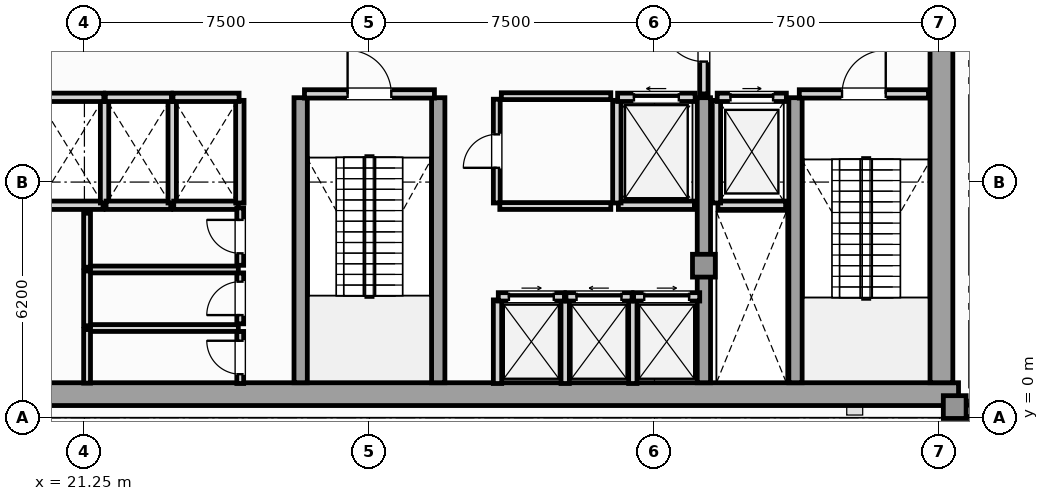
"""IFC4 building model, lengths in metres.
Left out: names, types, materials, properties, quantities, classifications, styles, units other than length and angle.
Written with IfcOpenShell. Run it as: python <this file> out.ifc"""

import sys

from ifc_helpers import new_model, si_unit, direction, frame, frame_2d, origin, origin_2d, place, context, subcontext, project, spatial, rectangle, extrude, element, fill, save


model = new_model("IFC4")
c1 = context("Model", 3, precision=1e-05, world=origin(), true_north=direction((0.0, 1.0)))
c2 = subcontext(c1, "Body", "Model", "MODEL_VIEW")
j1 = project(units=[si_unit("LENGTHUNIT", "METRE"), si_unit("PLANEANGLEUNIT", "RADIAN")], contexts=[c1])
p1 = place(None, origin())
s1 = spatial("IfcSite", under=j1, at=p1, CompositionType="ELEMENT")
p2 = place(p1, origin())
s2 = spatial("IfcBuilding", under=s1, at=p2, CompositionType="ELEMENT")
p3 = place(p2, frame((0.0, 0.0, 187.55)))
s3 = spatial("IfcBuildingStorey", under=s2, at=p3, CompositionType="ELEMENT", Elevation=187.55)
p4 = place(p3, frame((13.25, 0.62, 0.0), z_axis=(0.0, 0.0, 1.0), x_axis=(1.0, 0.0, 0.0)))
e1 = element("IfcWall", 1, at=p4, inside=s3, PredefinedType="SHEAR", context=c2, shape_type="SweptSolid", body=[
    extrude(rectangle(XDim=31.0, YDim=0.6, at=frame_2d((15.5, 0.0))), origin(), (0.0, 0.0, 1.0), 4.83),
])
p5 = place(p3, frame((43.8, 0.92, 0.0), z_axis=(0.0, 0.0, 1.0), x_axis=(0.0, 1.0, 0.0)))
e2 = element("IfcWall", 2, at=p5, inside=s3, PredefinedType="SHEAR", context=c2, shape_type="SweptSolid", body=[
    extrude(rectangle(XDim=10.53, YDim=0.6, at=frame_2d((5.265, 0.0))), origin(), (0.0, 0.0, 1.0), 4.83),
])
for number, where, z_axis, x_axis in (
    (3, (26.94, 0.92, 0.0), (0.0, 0.0, 1.0), (0.0, 1.0, 0.0)),
    (4, (30.56, 0.92, 0.0), (0.0, 0.0, 1.0), (0.0, 1.0, 0.0)),
    (5, (37.55, 0.92, 0.0), (0.0, 0.0, 1.0), (0.0, 1.0, 0.0)),
    (6, (39.96, 0.92, 0.0), (0.0, 0.0, 1.0), (0.0, 1.0, 0.0)),
):
    element("IfcWall", number, at=place(p3, frame(where, z_axis=z_axis, x_axis=x_axis)), inside=s3, PredefinedType="SHEAR", context=c2, shape_type="SweptSolid", body=[
        extrude(rectangle(XDim=7.5, YDim=0.35, at=frame_2d((3.75, 0.0))), origin(), (0.0, 0.0, 1.0), 4.83),
    ])
for number, where, z_axis, x_axis in (
    (7, (44.15, 0.28, 0.0), (0.0, 0.0, 1.0), (1.0, 0.0, 0.0)),
    (8, (37.55, 4.0, 0.0), (0.0, 0.0, 1.0), (1.0, 0.0, 0.0)),
):
    element("IfcColumn", number, at=place(p3, frame(where, z_axis=z_axis, x_axis=x_axis)), inside=s3, PredefinedType="COLUMN", context=c2, shape_type="SweptSolid", body=[
        extrude(rectangle(XDim=0.6, YDim=0.6, at=origin_2d()), origin(), (0.0, 0.0, 1.0), 5.05),
    ])
p6 = place(p3, frame((44.25, 0.18, 0.0), z_axis=(0.0, 0.0, 1.0), x_axis=(1.0, 0.0, 0.0)))
e9 = element("IfcWall", 9, at=p6, inside=s3, PredefinedType="SOLIDWALL", context=c2, shape_type="SweptSolid", body=[
    extrude(rectangle(XDim=4.81, YDim=0.3, at=frame_2d((2.405, 0.0))), origin(), (0.0, 0.0, 1.0), 4.83),
])
p7 = place(p6, frame((1.655, 0.0, 0.9)))
e10 = element("IfcOpeningElement", 10, at=p7, cuts=e9, PredefinedType="OPENING", context=c2, shape_type="SweptSolid", body=[
    extrude(rectangle(XDim=1.5, YDim=1.95, at=frame_2d((0.75, 0.975))), frame((0.0, 0.16, 0.0), z_axis=(0.0, -1.0, 0.0), x_axis=(1.0, 0.0, 0.0)), (0.0, 0.0, 1.0), 0.32),
])
p8 = place(p3, frame((37.92, 5.59, 0.0), z_axis=(0.0, 0.0, 1.0), x_axis=(1.0, 0.0, 0.0)))
e11 = element("IfcWall", 11, at=p8, inside=s3, PredefinedType="SOLIDWALL", context=c2, shape_type="SweptSolid", body=[
    extrude(rectangle(XDim=1.78, YDim=0.22, at=frame_2d((0.89, 0.0))), origin(), (0.0, 0.0, 1.0), 4.83),
])
p9 = place(p3, frame((37.88, 5.65, 0.0), z_axis=(0.0, 0.0, 1.0), x_axis=(0.0, 1.0, 0.0)))
e12 = element("IfcWall", 12, at=p9, inside=s3, PredefinedType="SOLIDWALL", context=c2, shape_type="SweptSolid", body=[
    extrude(rectangle(XDim=2.7, YDim=0.22, at=frame_2d((1.35, 0.0))), origin(), (0.0, 0.0, 1.0), 4.83),
])
p10 = place(p3, frame((37.9, 8.43, 0.0), z_axis=(0.0, 0.0, 1.0), x_axis=(1.0, 0.0, 0.0)))
e13 = element("IfcWall", 13, at=p10, inside=s3, PredefinedType="SOLIDWALL", context=c2, shape_type="SweptSolid", body=[
    extrude(rectangle(XDim=1.82, YDim=0.22, at=frame_2d((0.91, 0.0))), origin(), (0.0, 0.0, 1.0), 4.83),
])
p11 = place(p10, frame((0.35, 0.0, 0.0)))
e14 = element("IfcOpeningElement", 14, at=p11, cuts=e13, PredefinedType="OPENING", context=c2, shape_type="SweptSolid", body=[
    extrude(rectangle(XDim=1.12, YDim=2.25, at=frame_2d((0.56, 1.125))), frame((0.0, 0.12, 0.0), z_axis=(0.0, -1.0, 0.0), x_axis=(1.0, 0.0, 0.0)), (0.0, 0.0, 1.0), 0.24),
])
p12 = place(p3, frame((35.3, 5.59, 0.0), z_axis=(0.0, 0.0, 1.0), x_axis=(1.0, 0.0, 0.0)))
e15 = element("IfcWall", 15, at=p12, inside=s3, PredefinedType="SOLIDWALL", context=c2, shape_type="SweptSolid", body=[
    extrude(rectangle(XDim=2.0, YDim=0.22, at=frame_2d((1.0, 0.0))), origin(), (0.0, 0.0, 1.0), 4.83),
])
p13 = place(p3, frame((35.26, 5.65, 0.0), z_axis=(0.0, 0.0, 1.0), x_axis=(0.0, 1.0, 0.0)))
e16 = element("IfcWall", 16, at=p13, inside=s3, PredefinedType="SOLIDWALL", context=c2, shape_type="SweptSolid", body=[
    extrude(rectangle(XDim=2.7, YDim=0.22, at=frame_2d((1.35, 0.0))), origin(), (0.0, 0.0, 1.0), 4.83),
])
p14 = place(p3, frame((35.28, 8.43, 0.0), z_axis=(0.0, 0.0, 1.0), x_axis=(1.0, 0.0, 0.0)))
e17 = element("IfcWall", 17, at=p14, inside=s3, PredefinedType="SOLIDWALL", context=c2, shape_type="SweptSolid", body=[
    extrude(rectangle(XDim=2.04, YDim=0.22, at=frame_2d((1.02, 0.0))), origin(), (0.0, 0.0, 1.0), 4.83),
])
p15 = place(p14, frame((0.43, 0.0, 0.0)))
e18 = element("IfcOpeningElement", 18, at=p15, cuts=e17, PredefinedType="OPENING", context=c2, shape_type="SweptSolid", body=[
    extrude(rectangle(XDim=1.18, YDim=2.2, at=frame_2d((0.59, 1.1))), frame((0.0, 0.12, 0.0), z_axis=(0.0, -1.0, 0.0), x_axis=(1.0, 0.0, 0.0)), (0.0, 0.0, 1.0), 0.24),
])
for number, where, z_axis, x_axis in (
    (19, (32.12, 0.9, 0.0), (0.0, 0.0, 1.0), (0.0, 1.0, 0.0)),
    (20, (33.9, 0.9, 0.0), (0.0, 0.0, 1.0), (0.0, 1.0, 0.0)),
):
    element("IfcWall", number, at=place(p3, frame(where, z_axis=z_axis, x_axis=x_axis)), inside=s3, PredefinedType="SOLIDWALL", context=c2, shape_type="SweptSolid", body=[
        extrude(rectangle(XDim=2.2, YDim=0.22, at=frame_2d((1.1, 0.0))), origin(), (0.0, 0.0, 1.0), 4.83),
    ])
p16 = place(p3, frame((32.14, 3.18, 0.0), z_axis=(0.0, 0.0, 1.0), x_axis=(1.0, 0.0, 0.0)))
e21 = element("IfcWall", 21, at=p16, inside=s3, PredefinedType="SOLIDWALL", context=c2, shape_type="SweptSolid", body=[
    extrude(rectangle(XDim=1.74, YDim=0.22, at=frame_2d((0.87, 0.0))), origin(), (0.0, 0.0, 1.0), 4.83),
])
p17 = place(p16, frame((0.28, 0.0, 0.0)))
e22 = element("IfcOpeningElement", 22, at=p17, cuts=e21, PredefinedType="OPENING", context=c2, shape_type="SweptSolid", body=[
    extrude(rectangle(XDim=1.18, YDim=2.2, at=frame_2d((0.59, 1.1))), frame((0.0, 0.12, 0.0), z_axis=(0.0, -1.0, 0.0), x_axis=(1.0, 0.0, 0.0)), (0.0, 0.0, 1.0), 0.24),
])
p18 = place(p3, frame((35.68, 0.9, 0.0), z_axis=(0.0, 0.0, 1.0), x_axis=(0.0, 1.0, 0.0)))
e23 = element("IfcWall", 23, at=p18, inside=s3, PredefinedType="SOLIDWALL", context=c2, shape_type="SweptSolid", body=[
    extrude(rectangle(XDim=2.2, YDim=0.22, at=frame_2d((1.1, 0.0))), origin(), (0.0, 0.0, 1.0), 4.83),
])
p19 = place(p3, frame((33.92, 3.18, 0.0), z_axis=(0.0, 0.0, 1.0), x_axis=(1.0, 0.0, 0.0)))
e24 = element("IfcWall", 24, at=p19, inside=s3, PredefinedType="SOLIDWALL", context=c2, shape_type="SweptSolid", body=[
    extrude(rectangle(XDim=1.74, YDim=0.22, at=frame_2d((0.87, 0.0))), origin(), (0.0, 0.0, 1.0), 4.83),
])
p20 = place(p19, frame((0.28, 0.0, 0.0)))
e25 = element("IfcOpeningElement", 25, at=p20, cuts=e24, PredefinedType="OPENING", context=c2, shape_type="SweptSolid", body=[
    extrude(rectangle(XDim=1.18, YDim=2.2, at=frame_2d((0.59, 1.1))), frame((0.0, 0.12, 0.0), z_axis=(0.0, -1.0, 0.0), x_axis=(1.0, 0.0, 0.0)), (0.0, 0.0, 1.0), 0.24),
])
p21 = place(p3, frame((35.7, 3.18, 0.0), z_axis=(0.0, 0.0, 1.0), x_axis=(1.0, 0.0, 0.0)))
e26 = element("IfcWall", 26, at=p21, inside=s3, PredefinedType="SOLIDWALL", context=c2, shape_type="SweptSolid", body=[
    extrude(rectangle(XDim=1.74, YDim=0.22, at=frame_2d((0.87, 0.0))), origin(), (0.0, 0.0, 1.0), 4.83),
])
p22 = place(p21, frame((0.28, 0.0, 0.0)))
e27 = element("IfcOpeningElement", 27, at=p22, cuts=e26, PredefinedType="OPENING", context=c2, shape_type="SweptSolid", body=[
    extrude(rectangle(XDim=1.18, YDim=2.2, at=frame_2d((0.59, 1.1))), frame((0.0, 0.12, 0.0), z_axis=(0.0, -1.0, 0.0), x_axis=(1.0, 0.0, 0.0)), (0.0, 0.0, 1.0), 0.24),
])
p23 = place(p3, frame((20.04, 5.59, 0.0), z_axis=(0.0, 0.0, 1.0), x_axis=(1.0, 0.0, 0.0)))
e28 = element("IfcWall", 28, at=p23, inside=s3, PredefinedType="SOLIDWALL", context=c2, shape_type="SweptSolid", body=[
    extrude(rectangle(XDim=1.7, YDim=0.22, at=frame_2d((0.85, 0.0))), origin(), (0.0, 0.0, 1.0), 4.83),
])
p24 = place(p3, frame((21.78, 5.65, 0.0), z_axis=(0.0, 0.0, 1.0), x_axis=(0.0, 1.0, 0.0)))
e29 = element("IfcWall", 29, at=p24, inside=s3, PredefinedType="SOLIDWALL", context=c2, shape_type="SweptSolid", body=[
    extrude(rectangle(XDim=2.7, YDim=0.22, at=frame_2d((1.35, 0.0))), origin(), (0.0, 0.0, 1.0), 4.83),
])
p25 = place(p3, frame((20.02, 8.43, 0.0), z_axis=(0.0, 0.0, 1.0), x_axis=(1.0, 0.0, 0.0)))
e30 = element("IfcWall", 30, at=p25, inside=s3, PredefinedType="SOLIDWALL", context=c2, shape_type="SweptSolid", body=[
    extrude(rectangle(XDim=1.74, YDim=0.22, at=frame_2d((0.87, 0.0))), origin(), (0.0, 0.0, 1.0), 4.83),
])
p26 = place(p3, frame((21.82, 5.59, 0.0), z_axis=(0.0, 0.0, 1.0), x_axis=(1.0, 0.0, 0.0)))
e31 = element("IfcWall", 31, at=p26, inside=s3, PredefinedType="SOLIDWALL", context=c2, shape_type="SweptSolid", body=[
    extrude(rectangle(XDim=1.7, YDim=0.22, at=frame_2d((0.85, 0.0))), origin(), (0.0, 0.0, 1.0), 4.83),
])
p27 = place(p3, frame((23.56, 5.65, 0.0), z_axis=(0.0, 0.0, 1.0), x_axis=(0.0, 1.0, 0.0)))
e32 = element("IfcWall", 32, at=p27, inside=s3, PredefinedType="SOLIDWALL", context=c2, shape_type="SweptSolid", body=[
    extrude(rectangle(XDim=2.7, YDim=0.22, at=frame_2d((1.35, 0.0))), origin(), (0.0, 0.0, 1.0), 4.83),
])
p28 = place(p3, frame((21.8, 8.43, 0.0), z_axis=(0.0, 0.0, 1.0), x_axis=(1.0, 0.0, 0.0)))
e33 = element("IfcWall", 33, at=p28, inside=s3, PredefinedType="SOLIDWALL", context=c2, shape_type="SweptSolid", body=[
    extrude(rectangle(XDim=1.74, YDim=0.22, at=frame_2d((0.87, 0.0))), origin(), (0.0, 0.0, 1.0), 4.83),
])
p29 = place(p3, frame((23.6, 5.59, 0.0), z_axis=(0.0, 0.0, 1.0), x_axis=(1.0, 0.0, 0.0)))
e34 = element("IfcWall", 34, at=p29, inside=s3, PredefinedType="SOLIDWALL", context=c2, shape_type="SweptSolid", body=[
    extrude(rectangle(XDim=1.7, YDim=0.22, at=frame_2d((0.85, 0.0))), origin(), (0.0, 0.0, 1.0), 4.83),
])
p30 = place(p3, frame((25.34, 5.65, 0.0), z_axis=(0.0, 0.0, 1.0), x_axis=(0.0, 1.0, 0.0)))
e35 = element("IfcWall", 35, at=p30, inside=s3, PredefinedType="SOLIDWALL", context=c2, shape_type="SweptSolid", body=[
    extrude(rectangle(XDim=2.7, YDim=0.22, at=frame_2d((1.35, 0.0))), origin(), (0.0, 0.0, 1.0), 4.83),
])
p31 = place(p3, frame((23.58, 8.43, 0.0), z_axis=(0.0, 0.0, 1.0), x_axis=(1.0, 0.0, 0.0)))
e36 = element("IfcWall", 36, at=p31, inside=s3, PredefinedType="SOLIDWALL", context=c2, shape_type="SweptSolid", body=[
    extrude(rectangle(XDim=1.74, YDim=0.22, at=frame_2d((0.87, 0.0))), origin(), (0.0, 0.0, 1.0), 4.83),
])
p32 = place(p3, frame((40.06, 8.52, 0.0), z_axis=(0.0, 0.0, 1.0), x_axis=(1.0, 0.0, 0.0)))
e37 = element("IfcWall", 37, at=p32, inside=s3, PredefinedType="SOLIDWALL", context=c2, shape_type="SweptSolid", body=[
    extrude(rectangle(XDim=3.4, YDim=0.22, at=frame_2d((1.7, 0.0))), origin(), (0.0, 0.0, 1.0), 4.83),
])
p33 = place(p32, frame((1.125, 0.0, 0.0)))
e38 = element("IfcOpeningElement", 38, at=p33, cuts=e37, PredefinedType="OPENING", context=c2, shape_type="SweptSolid", body=[
    extrude(rectangle(XDim=1.15, YDim=2.2, at=frame_2d((0.575, 1.1))), frame((0.0, 0.12, 0.0), z_axis=(0.0, -1.0, 0.0), x_axis=(1.0, 0.0, 0.0)), (0.0, 0.0, 1.0), 0.24),
])
p34 = place(p3, frame((27.04, 8.52, 0.0), z_axis=(0.0, 0.0, 1.0), x_axis=(1.0, 0.0, 0.0)))
e39 = element("IfcWall", 39, at=p34, inside=s3, PredefinedType="SOLIDWALL", context=c2, shape_type="SweptSolid", body=[
    extrude(rectangle(XDim=3.42, YDim=0.22, at=frame_2d((1.71, 0.0))), origin(), (0.0, 0.0, 1.0), 4.83),
])
p35 = place(p34, frame((1.135, 0.0, 0.0)))
e40 = element("IfcOpeningElement", 40, at=p35, cuts=e39, PredefinedType="OPENING", context=c2, shape_type="SweptSolid", body=[
    extrude(rectangle(XDim=1.15, YDim=2.2, at=frame_2d((0.575, 1.1))), frame((0.0, 0.12, 0.0), z_axis=(0.0, -1.0, 0.0), x_axis=(1.0, 0.0, 0.0)), (0.0, 0.0, 1.0), 0.24),
])
p36 = place(p3, frame((37.55, 8.52, 0.0), z_axis=(0.0, 0.0, 1.0), x_axis=(0.0, 1.0, 0.0)))
e41 = element("IfcWall", 41, at=p36, inside=s3, PredefinedType="SOLIDWALL", context=c2, shape_type="SweptSolid", body=[
    extrude(rectangle(XDim=2.8, YDim=0.22, at=frame_2d((1.4, 0.0))), origin(), (0.0, 0.0, 1.0), 4.285),
])
p37 = place(p36, frame((0.85, 0.0, 0.0)))
e42 = element("IfcOpeningElement", 42, at=p37, cuts=e41, PredefinedType="OPENING", context=c2, shape_type="SweptSolid", body=[
    extrude(rectangle(XDim=1.1, YDim=2.2, at=frame_2d((0.55, 1.1))), frame((0.0, 0.12, 0.0), z_axis=(0.0, -1.0, 0.0), x_axis=(1.0, 0.0, 0.0)), (0.0, 0.0, 1.0), 0.24),
])
p38 = place(p3, frame((25.35, 0.9, 0.0), z_axis=(0.0, 0.0, 1.0), x_axis=(0.0, 1.0, 0.0)))
e43 = element("IfcWall", 43, at=p38, inside=s3, PredefinedType="PARTITIONING", context=c2, shape_type="SweptSolid", body=[
    extrude(rectangle(XDim=1.37, YDim=0.18, at=frame_2d((0.685, 0.0))), origin(), (0.0, 0.0, 1.0), 4.83),
])
p39 = place(p38, frame((0.245, 0.0, 0.0)))
e44 = element("IfcOpeningElement", 44, at=p39, cuts=e43, PredefinedType="OPENING", context=c2, shape_type="SweptSolid", body=[
    extrude(rectangle(XDim=0.88, YDim=2.05, at=frame_2d((0.44, 1.025))), frame((0.0, 0.1, 0.0), z_axis=(0.0, -1.0, 0.0), x_axis=(1.0, 0.0, 0.0)), (0.0, 0.0, 1.0), 0.2),
])
p40 = place(p3, frame((21.36, 2.36, 0.0), z_axis=(0.0, 0.0, 1.0), x_axis=(1.0, 0.0, 0.0)))
e45 = element("IfcWall", 45, at=p40, inside=s3, PredefinedType="PARTITIONING", context=c2, shape_type="SweptSolid", body=[
    extrude(rectangle(XDim=3.94, YDim=0.18, at=frame_2d((1.97, 0.0))), origin(), (0.0, 0.0, 1.0), 4.83),
])
p41 = place(p3, frame((21.32, 0.91, 0.0), z_axis=(0.0, 0.0, 1.0), x_axis=(0.0, 1.0, 0.0)))
e46 = element("IfcWall", 46, at=p41, inside=s3, PredefinedType="PARTITIONING", context=c2, shape_type="SweptSolid", body=[
    extrude(rectangle(XDim=1.41, YDim=0.18, at=frame_2d((0.705, 0.0))), origin(), (0.0, 0.0, 1.0), 4.83),
])
p42 = place(p3, frame((25.35, 2.47, 0.0), z_axis=(0.0, 0.0, 1.0), x_axis=(0.0, 1.0, 0.0)))
e47 = element("IfcWall", 47, at=p42, inside=s3, PredefinedType="PARTITIONING", context=c2, shape_type="SweptSolid", body=[
    extrude(rectangle(XDim=1.34, YDim=0.18, at=frame_2d((0.67, 0.0))), origin(), (0.0, 0.0, 1.0), 4.83),
])
p43 = place(p42, frame((0.23, 0.0, 0.0)))
e48 = element("IfcOpeningElement", 48, at=p43, cuts=e47, PredefinedType="OPENING", context=c2, shape_type="SweptSolid", body=[
    extrude(rectangle(XDim=0.88, YDim=2.05, at=frame_2d((0.44, 1.025))), frame((0.0, 0.1, 0.0), z_axis=(0.0, -1.0, 0.0), x_axis=(1.0, 0.0, 0.0)), (0.0, 0.0, 1.0), 0.2),
])
p44 = place(p3, frame((21.36, 3.9, 0.0), z_axis=(0.0, 0.0, 1.0), x_axis=(1.0, 0.0, 0.0)))
e49 = element("IfcWall", 49, at=p44, inside=s3, PredefinedType="PARTITIONING", context=c2, shape_type="SweptSolid", body=[
    extrude(rectangle(XDim=3.94, YDim=0.18, at=frame_2d((1.97, 0.0))), origin(), (0.0, 0.0, 1.0), 4.83),
])
p45 = place(p3, frame((21.32, 2.42, 0.0), z_axis=(0.0, 0.0, 1.0), x_axis=(0.0, 1.0, 0.0)))
e50 = element("IfcWall", 50, at=p45, inside=s3, PredefinedType="PARTITIONING", context=c2, shape_type="SweptSolid", body=[
    extrude(rectangle(XDim=1.44, YDim=0.18, at=frame_2d((0.72, 0.0))), origin(), (0.0, 0.0, 1.0), 4.83),
])
p46 = place(p3, frame((25.35, 4.01, 0.0), z_axis=(0.0, 0.0, 1.0), x_axis=(0.0, 1.0, 0.0)))
e51 = element("IfcWall", 51, at=p46, inside=s3, PredefinedType="PARTITIONING", context=c2, shape_type="SweptSolid", body=[
    extrude(rectangle(XDim=1.51, YDim=0.18, at=frame_2d((0.755, 0.0))), origin(), (0.0, 0.0, 1.0), 4.83),
])
p47 = place(p46, frame((0.315, 0.0, 0.0)))
e52 = element("IfcOpeningElement", 52, at=p47, cuts=e51, PredefinedType="OPENING", context=c2, shape_type="SweptSolid", body=[
    extrude(rectangle(XDim=0.88, YDim=2.05, at=frame_2d((0.44, 1.025))), frame((0.0, 0.1, 0.0), z_axis=(0.0, -1.0, 0.0), x_axis=(1.0, 0.0, 0.0)), (0.0, 0.0, 1.0), 0.2),
])
p48 = place(p3, frame((21.32, 3.96, 0.0), z_axis=(0.0, 0.0, 1.0), x_axis=(0.0, 1.0, 0.0)))
e53 = element("IfcWall", 53, at=p48, inside=s3, PredefinedType="PARTITIONING", context=c2, shape_type="SweptSolid", body=[
    extrude(rectangle(XDim=1.42, YDim=0.18, at=frame_2d((0.71, 0.0))), origin(), (0.0, 0.0, 1.0), 4.83),
])
p49 = place(p3, frame((32.1, 5.65, 0.0), z_axis=(0.0, 0.0, 1.0), x_axis=(0.0, 1.0, 0.0)))
e54 = element("IfcWall", 54, at=p49, inside=s3, PredefinedType="PARTITIONING", context=c2, shape_type="SweptSolid", body=[
    extrude(rectangle(XDim=2.73, YDim=0.18, at=frame_2d((1.365, 0.0))), origin(), (0.0, 0.0, 1.0), 4.83),
])
p50 = place(p49, frame((0.925, 0.0, 0.0)))
e55 = element("IfcOpeningElement", 55, at=p50, cuts=e54, PredefinedType="OPENING", context=c2, shape_type="SweptSolid", body=[
    extrude(rectangle(XDim=0.88, YDim=2.05, at=frame_2d((0.44, 1.025))), frame((0.0, 0.1, 0.0), z_axis=(0.0, -1.0, 0.0), x_axis=(1.0, 0.0, 0.0)), (0.0, 0.0, 1.0), 0.2),
])
p51 = place(p3, frame((32.22, 8.46, 0.0), z_axis=(0.0, 0.0, 1.0), x_axis=(1.0, 0.0, 0.0)))
e56 = element("IfcWall", 56, at=p51, inside=s3, PredefinedType="PARTITIONING", context=c2, shape_type="SweptSolid", body=[
    extrude(rectangle(XDim=2.88, YDim=0.18, at=frame_2d((1.44, 0.0))), origin(), (0.0, 0.0, 1.0), 4.83),
])
p52 = place(p3, frame((32.18, 5.57, 0.0), z_axis=(0.0, 0.0, 1.0), x_axis=(1.0, 0.0, 0.0)))
e57 = element("IfcWall", 57, at=p52, inside=s3, PredefinedType="PARTITIONING", context=c2, shape_type="SweptSolid", body=[
    extrude(rectangle(XDim=2.92, YDim=0.18, at=frame_2d((1.46, 0.0))), origin(), (0.0, 0.0, 1.0), 4.83),
])
p53 = place(p11, origin())
e58 = element("IfcDoor", 58, at=p53, inside=s3, OperationType="SLIDING_TO_RIGHT", PredefinedType="DOOR", context=c2, shape_type="SweptSolid", body=[
    extrude(rectangle(XDim=1.12, YDim=2.25, at=frame_2d((0.56, 1.125))), frame((0.0, 0.025, 0.0), z_axis=(0.0, -1.0, 0.0), x_axis=(1.0, 0.0, 0.0)), (0.0, 0.0, 1.0), 0.05),
])
fill(e14, e58)
p54 = place(p15, origin())
e59 = element("IfcDoor", 59, at=p54, inside=s3, OperationType="SLIDING_TO_LEFT", PredefinedType="DOOR", context=c2, shape_type="SweptSolid", body=[
    extrude(rectangle(XDim=1.18, YDim=2.2, at=frame_2d((0.59, 1.1))), frame((0.0, 0.025, 0.0), z_axis=(0.0, -1.0, 0.0), x_axis=(1.0, 0.0, 0.0)), (0.0, 0.0, 1.0), 0.05),
])
fill(e18, e59)
p55 = place(p17, origin())
e60 = element("IfcDoor", 60, at=p55, inside=s3, OperationType="SLIDING_TO_RIGHT", PredefinedType="DOOR", context=c2, shape_type="SweptSolid", body=[
    extrude(rectangle(XDim=1.18, YDim=2.2, at=frame_2d((0.59, 1.1))), frame((0.0, 0.025, 0.0), z_axis=(0.0, -1.0, 0.0), x_axis=(1.0, 0.0, 0.0)), (0.0, 0.0, 1.0), 0.05),
])
fill(e22, e60)
p56 = place(p20, origin())
e61 = element("IfcDoor", 61, at=p56, inside=s3, OperationType="SLIDING_TO_LEFT", PredefinedType="DOOR", context=c2, shape_type="SweptSolid", body=[
    extrude(rectangle(XDim=1.18, YDim=2.2, at=frame_2d((0.59, 1.1))), frame((0.0, 0.025, 0.0), z_axis=(0.0, -1.0, 0.0), x_axis=(1.0, 0.0, 0.0)), (0.0, 0.0, 1.0), 0.05),
])
fill(e25, e61)
p57 = place(p22, origin())
e62 = element("IfcDoor", 62, at=p57, inside=s3, OperationType="SLIDING_TO_RIGHT", PredefinedType="DOOR", context=c2, shape_type="SweptSolid", body=[
    extrude(rectangle(XDim=1.18, YDim=2.2, at=frame_2d((0.59, 1.1))), frame((0.0, 0.025, 0.0), z_axis=(0.0, -1.0, 0.0), x_axis=(1.0, 0.0, 0.0)), (0.0, 0.0, 1.0), 0.05),
])
fill(e27, e62)
p58 = place(p33, origin())
e63 = element("IfcDoor", 63, at=p58, inside=s3, OperationType="SINGLE_SWING_RIGHT", PredefinedType="DOOR", context=c2, shape_type="SweptSolid", body=[
    extrude(rectangle(XDim=1.15, YDim=2.2, at=frame_2d((0.575, 1.1))), frame((0.0, 0.025, 0.0), z_axis=(0.0, -1.0, 0.0), x_axis=(1.0, 0.0, 0.0)), (0.0, 0.0, 1.0), 0.05),
])
fill(e38, e63)
p59 = place(p35, origin())
e64 = element("IfcDoor", 64, at=p59, inside=s3, OperationType="SINGLE_SWING_LEFT", PredefinedType="DOOR", context=c2, shape_type="SweptSolid", body=[
    extrude(rectangle(XDim=1.15, YDim=2.2, at=frame_2d((0.575, 1.1))), frame((0.0, 0.025, 0.0), z_axis=(0.0, -1.0, 0.0), x_axis=(1.0, 0.0, 0.0)), (0.0, 0.0, 1.0), 0.05),
])
fill(e40, e64)
p60 = place(p37, origin())
e65 = element("IfcDoor", 65, at=p60, inside=s3, OperationType="SINGLE_SWING_RIGHT", PredefinedType="DOOR", context=c2, shape_type="SweptSolid", body=[
    extrude(rectangle(XDim=1.1, YDim=2.2, at=frame_2d((0.55, 1.1))), frame((0.0, 0.025, 0.0), z_axis=(0.0, -1.0, 0.0), x_axis=(1.0, 0.0, 0.0)), (0.0, 0.0, 1.0), 0.05),
])
fill(e42, e65)
p61 = place(p39, origin())
e66 = element("IfcDoor", 66, at=p61, inside=s3, OperationType="SINGLE_SWING_RIGHT", PredefinedType="DOOR", context=c2, shape_type="SweptSolid", body=[
    extrude(rectangle(XDim=0.88, YDim=2.05, at=frame_2d((0.44, 1.025))), frame((0.0, 0.025, 0.0), z_axis=(0.0, -1.0, 0.0), x_axis=(1.0, 0.0, 0.0)), (0.0, 0.0, 1.0), 0.05),
])
fill(e44, e66)
p62 = place(p43, origin())
e67 = element("IfcDoor", 67, at=p62, inside=s3, OperationType="SINGLE_SWING_LEFT", PredefinedType="DOOR", context=c2, shape_type="SweptSolid", body=[
    extrude(rectangle(XDim=0.88, YDim=2.05, at=frame_2d((0.44, 1.025))), frame((0.0, 0.025, 0.0), z_axis=(0.0, -1.0, 0.0), x_axis=(1.0, 0.0, 0.0)), (0.0, 0.0, 1.0), 0.05),
])
fill(e48, e67)
p63 = place(p47, origin())
e68 = element("IfcDoor", 68, at=p63, inside=s3, OperationType="SINGLE_SWING_RIGHT", PredefinedType="DOOR", context=c2, shape_type="SweptSolid", body=[
    extrude(rectangle(XDim=0.88, YDim=2.05, at=frame_2d((0.44, 1.025))), frame((0.0, 0.025, 0.0), z_axis=(0.0, -1.0, 0.0), x_axis=(1.0, 0.0, 0.0)), (0.0, 0.0, 1.0), 0.05),
])
fill(e52, e68)
p64 = place(p50, origin())
e69 = element("IfcDoor", 69, at=p64, inside=s3, OperationType="SINGLE_SWING_LEFT", PredefinedType="DOOR", context=c2, shape_type="SweptSolid", body=[
    extrude(rectangle(XDim=0.88, YDim=2.05, at=frame_2d((0.44, 1.025))), frame((0.0, 0.025, 0.0), z_axis=(0.0, -1.0, 0.0), x_axis=(1.0, 0.0, 0.0)), (0.0, 0.0, 1.0), 0.05),
])
fill(e55, e69)
save(model, sys.argv[1])
